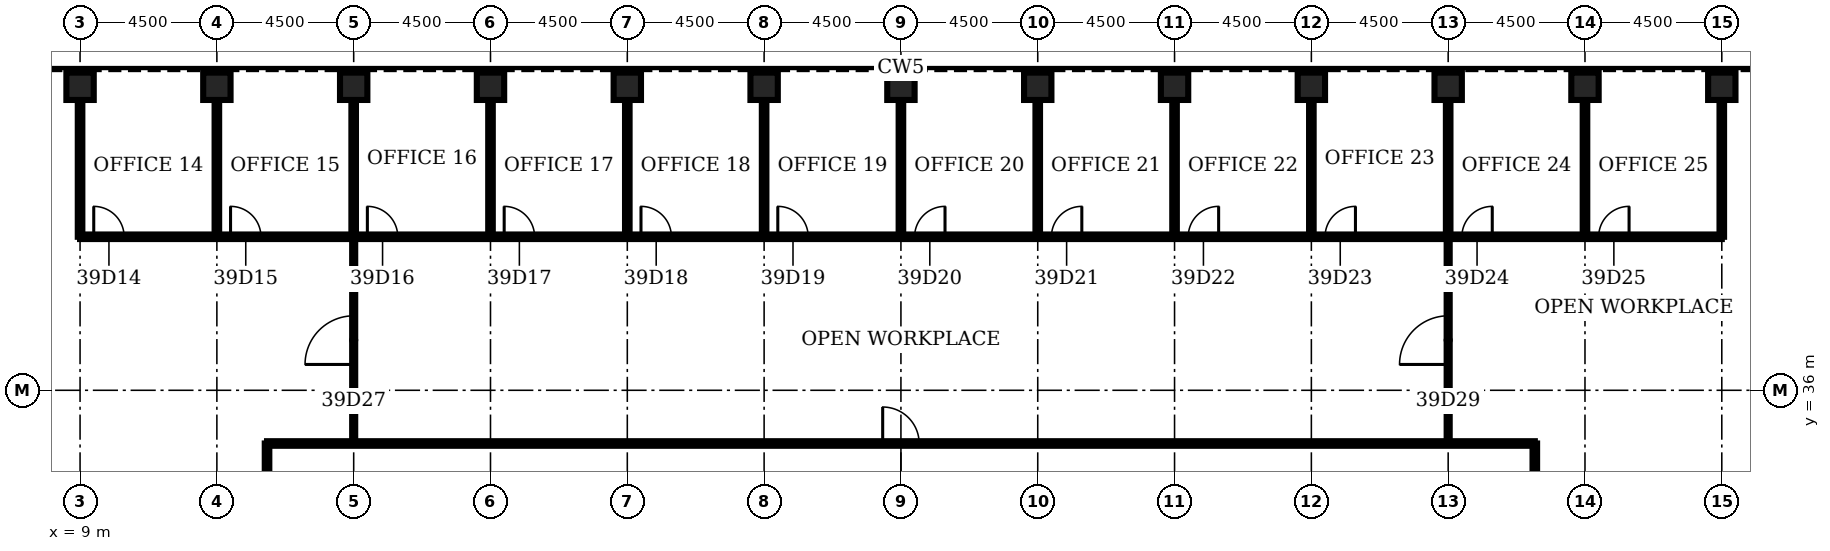
"""IFC4 building model, lengths in metres.
Left out: names, types, materials, properties, quantities, classifications, styles, units other than length and angle.
Written with IfcOpenShell. Run it as: python <this file> out.ifc"""

import sys

from ifc_helpers import new_model, si_unit, direction, frame, frame_2d, origin, origin_2d, place, context, subcontext, project, spatial, rectangle, hollow_rectangle, extrude, element, fill, save


model = new_model("IFC4")
c1 = context("Model", 3, precision=1e-05, world=origin(), true_north=direction((0.0, 1.0)))
c2 = subcontext(c1, "Body", "Model", "MODEL_VIEW")
j1 = project(units=[si_unit("LENGTHUNIT", "METRE"), si_unit("PLANEANGLEUNIT", "RADIAN")], contexts=[c1])
p1 = place(None, origin())
s1 = spatial("IfcSite", under=j1, at=p1, CompositionType="ELEMENT")
p2 = place(p1, origin())
s2 = spatial("IfcBuilding", under=s1, at=p2, CompositionType="ELEMENT")
p3 = place(p2, frame((0.0, 0.0, 176.1)))
s3 = spatial("IfcBuildingStorey", under=s2, at=p3, CompositionType="ELEMENT", Elevation=176.1)
for number, where, z_axis, x_axis in (
    (1, (63.0, 46.0, 0.0), (0.0, 0.0, 1.0), (0.0, 1.0, 0.0)),
    (2, (58.5, 46.0, 0.0), (0.0, 0.0, 1.0), (0.0, 1.0, 0.0)),
    (3, (54.0, 46.0, 0.0), (0.0, 0.0, 1.0), (0.0, 1.0, 0.0)),
    (4, (49.5, 46.0, 0.0), (0.0, 0.0, 1.0), (0.0, 1.0, 0.0)),
    (5, (45.0, 46.0, 0.0), (0.0, 0.0, 1.0), (0.0, 1.0, 0.0)),
    (6, (40.5, 46.0, 0.0), (0.0, 0.0, 1.0), (0.0, 1.0, 0.0)),
    (7, (36.0, 46.0, 0.0), (0.0, 0.0, 1.0), (0.0, 1.0, 0.0)),
    (8, (31.5, 46.0, 0.0), (0.0, 0.0, 1.0), (0.0, 1.0, 0.0)),
    (9, (27.0, 46.0, 0.0), (0.0, 0.0, 1.0), (0.0, 1.0, 0.0)),
    (10, (22.5, 46.0, 0.0), (0.0, 0.0, 1.0), (0.0, 1.0, 0.0)),
    (11, (18.0, 46.0, 0.0), (0.0, 0.0, 1.0), (0.0, 1.0, 0.0)),
    (12, (13.5, 46.0, 0.0), (0.0, 0.0, 1.0), (0.0, 1.0, 0.0)),
    (13, (9.0, 46.0, 0.0), (0.0, 0.0, 1.0), (0.0, 1.0, 0.0)),
):
    element("IfcColumn", number, at=place(p3, frame(where, z_axis=z_axis, x_axis=x_axis)), inside=s3, PredefinedType="COLUMN", context=c2, shape_type="SweptSolid", body=[
        extrude(hollow_rectangle(XDim=0.9, YDim=0.9, WallThickness=0.09, at=origin_2d()), origin(), (0.0, 0.0, 1.0), 4.2),
    ])
p4 = place(p3, frame((15.15, 34.25, 0.0), z_axis=(0.0, 0.0, 1.0), x_axis=(1.0, 0.0, 0.0)))
e14 = element("IfcWall", 14, at=p4, inside=s3, PredefinedType="PARTITIONING", context=c2, shape_type="SweptSolid", body=[
    extrude(rectangle(XDim=41.7, YDim=0.15, at=frame_2d((20.85, 0.0))), origin(), (0.0, 0.0, 1.0), 3.0),
])
p5 = place(p4, frame((20.25, 0.0, 0.0)))
e15 = element("IfcOpeningElement", 15, at=p5, cuts=e14, PredefinedType="OPENING", context=c2, shape_type="SweptSolid", body=[
    extrude(rectangle(XDim=1.2, YDim=2.1, at=frame_2d((0.6, 1.05))), frame((0.0, 0.085, 0.0), z_axis=(0.0, -1.0, 0.0), x_axis=(1.0, 0.0, 0.0)), (0.0, 0.0, 1.0), 0.17),
])
p6 = place(p3, frame((9.0, 41.05, 0.0), z_axis=(0.0, 0.0, 1.0), x_axis=(1.0, 0.0, 0.0)))
e16 = element("IfcWall", 16, at=p6, inside=s3, PredefinedType="PARTITIONING", context=c2, shape_type="SweptSolid", body=[
    extrude(rectangle(XDim=54.0, YDim=0.15, at=frame_2d((27.0, 0.0))), origin(), (0.0, 0.0, 1.0), 3.0),
])
p7 = place(p6, frame((0.45, 0.0, 0.0)))
e17 = element("IfcOpeningElement", 17, at=p7, cuts=e16, PredefinedType="OPENING", context=c2, shape_type="SweptSolid", body=[
    extrude(rectangle(XDim=1.0, YDim=2.1, at=frame_2d((0.5, 1.05))), frame((0.0, 0.085, 0.0), z_axis=(0.0, -1.0, 0.0), x_axis=(1.0, 0.0, 0.0)), (0.0, 0.0, 1.0), 0.17),
])
p8 = place(p6, frame((4.95, 0.0, 0.0)))
e18 = element("IfcOpeningElement", 18, at=p8, cuts=e16, PredefinedType="OPENING", context=c2, shape_type="SweptSolid", body=[
    extrude(rectangle(XDim=1.0, YDim=2.1, at=frame_2d((0.5, 1.05))), frame((0.0, 0.085, 0.0), z_axis=(0.0, -1.0, 0.0), x_axis=(1.0, 0.0, 0.0)), (0.0, 0.0, 1.0), 0.17),
])
p9 = place(p6, frame((9.45, 0.0, 0.0)))
e19 = element("IfcOpeningElement", 19, at=p9, cuts=e16, PredefinedType="OPENING", context=c2, shape_type="SweptSolid", body=[
    extrude(rectangle(XDim=1.0, YDim=2.1, at=frame_2d((0.5, 1.05))), frame((0.0, 0.085, 0.0), z_axis=(0.0, -1.0, 0.0), x_axis=(1.0, 0.0, 0.0)), (0.0, 0.0, 1.0), 0.17),
])
p10 = place(p6, frame((13.95, 0.0, 0.0)))
e20 = element("IfcOpeningElement", 20, at=p10, cuts=e16, PredefinedType="OPENING", context=c2, shape_type="SweptSolid", body=[
    extrude(rectangle(XDim=1.0, YDim=2.1, at=frame_2d((0.5, 1.05))), frame((0.0, 0.085, 0.0), z_axis=(0.0, -1.0, 0.0), x_axis=(1.0, 0.0, 0.0)), (0.0, 0.0, 1.0), 0.17),
])
p11 = place(p6, frame((18.45, 0.0, 0.0)))
e21 = element("IfcOpeningElement", 21, at=p11, cuts=e16, PredefinedType="OPENING", context=c2, shape_type="SweptSolid", body=[
    extrude(rectangle(XDim=1.0, YDim=2.1, at=frame_2d((0.5, 1.05))), frame((0.0, 0.085, 0.0), z_axis=(0.0, -1.0, 0.0), x_axis=(1.0, 0.0, 0.0)), (0.0, 0.0, 1.0), 0.17),
])
p12 = place(p6, frame((22.95, 0.0, 0.0)))
e22 = element("IfcOpeningElement", 22, at=p12, cuts=e16, PredefinedType="OPENING", context=c2, shape_type="SweptSolid", body=[
    extrude(rectangle(XDim=1.0, YDim=2.1, at=frame_2d((0.5, 1.05))), frame((0.0, 0.085, 0.0), z_axis=(0.0, -1.0, 0.0), x_axis=(1.0, 0.0, 0.0)), (0.0, 0.0, 1.0), 0.17),
])
p13 = place(p6, frame((27.45, 0.0, 0.0)))
e23 = element("IfcOpeningElement", 23, at=p13, cuts=e16, PredefinedType="OPENING", context=c2, shape_type="SweptSolid", body=[
    extrude(rectangle(XDim=1.0, YDim=2.1, at=frame_2d((0.5, 1.05))), frame((0.0, 0.085, 0.0), z_axis=(0.0, -1.0, 0.0), x_axis=(1.0, 0.0, 0.0)), (0.0, 0.0, 1.0), 0.17),
])
p14 = place(p6, frame((31.95, 0.0, 0.0)))
e24 = element("IfcOpeningElement", 24, at=p14, cuts=e16, PredefinedType="OPENING", context=c2, shape_type="SweptSolid", body=[
    extrude(rectangle(XDim=1.0, YDim=2.1, at=frame_2d((0.5, 1.05))), frame((0.0, 0.085, 0.0), z_axis=(0.0, -1.0, 0.0), x_axis=(1.0, 0.0, 0.0)), (0.0, 0.0, 1.0), 0.17),
])
p15 = place(p6, frame((36.45, 0.0, 0.0)))
e25 = element("IfcOpeningElement", 25, at=p15, cuts=e16, PredefinedType="OPENING", context=c2, shape_type="SweptSolid", body=[
    extrude(rectangle(XDim=1.0, YDim=2.1, at=frame_2d((0.5, 1.05))), frame((0.0, 0.085, 0.0), z_axis=(0.0, -1.0, 0.0), x_axis=(1.0, 0.0, 0.0)), (0.0, 0.0, 1.0), 0.17),
])
p16 = place(p6, frame((40.95, 0.0, 0.0)))
e26 = element("IfcOpeningElement", 26, at=p16, cuts=e16, PredefinedType="OPENING", context=c2, shape_type="SweptSolid", body=[
    extrude(rectangle(XDim=1.0, YDim=2.1, at=frame_2d((0.5, 1.05))), frame((0.0, 0.085, 0.0), z_axis=(0.0, -1.0, 0.0), x_axis=(1.0, 0.0, 0.0)), (0.0, 0.0, 1.0), 0.17),
])
p17 = place(p6, frame((45.45, 0.0, 0.0)))
e27 = element("IfcOpeningElement", 27, at=p17, cuts=e16, PredefinedType="OPENING", context=c2, shape_type="SweptSolid", body=[
    extrude(rectangle(XDim=1.0, YDim=2.1, at=frame_2d((0.5, 1.05))), frame((0.0, 0.085, 0.0), z_axis=(0.0, -1.0, 0.0), x_axis=(1.0, 0.0, 0.0)), (0.0, 0.0, 1.0), 0.17),
])
p18 = place(p6, frame((49.95, 0.0, 0.0)))
e28 = element("IfcOpeningElement", 28, at=p18, cuts=e16, PredefinedType="OPENING", context=c2, shape_type="SweptSolid", body=[
    extrude(rectangle(XDim=1.0, YDim=2.1, at=frame_2d((0.5, 1.05))), frame((0.0, 0.085, 0.0), z_axis=(0.0, -1.0, 0.0), x_axis=(1.0, 0.0, 0.0)), (0.0, 0.0, 1.0), 0.17),
])
for number, where, z_axis, x_axis in (
    (29, (9.0, 41.05, 0.0), (0.0, 0.0, 1.0), (0.0, 1.0, 0.0)),
    (30, (13.5, 41.05, 0.0), (0.0, 0.0, 1.0), (0.0, 1.0, 0.0)),
):
    element("IfcWall", number, at=place(p3, frame(where, z_axis=z_axis, x_axis=x_axis)), inside=s3, PredefinedType="PARTITIONING", context=c2, shape_type="SweptSolid", body=[
        extrude(rectangle(XDim=4.5, YDim=0.15, at=frame_2d((2.25, 0.0))), origin(), (0.0, 0.0, 1.0), 3.0),
    ])
p19 = place(p3, frame((15.15, 13.75, 0.0), z_axis=(0.0, 0.0, 1.0), x_axis=(0.0, 1.0, 0.0)))
e31 = element("IfcWall", 31, at=p19, inside=s3, PredefinedType="PARTITIONING", context=c2, shape_type="SweptSolid", body=[
    extrude(rectangle(XDim=20.5, YDim=0.15, at=frame_2d((10.25, 0.0))), origin(), (0.0, 0.0, 1.0), 3.0),
])
p20 = place(p19, frame((9.65, 0.0, 0.0)))
e32 = element("IfcOpeningElement", 32, at=p20, cuts=e31, PredefinedType="OPENING", context=c2, shape_type="SweptSolid", body=[
    extrude(rectangle(XDim=1.2, YDim=2.1, at=frame_2d((0.6, 1.05))), frame((0.0, 0.085, 0.0), z_axis=(0.0, -1.0, 0.0), x_axis=(1.0, 0.0, 0.0)), (0.0, 0.0, 1.0), 0.17),
])
p21 = place(p3, frame((18.0, 34.25, 0.0), z_axis=(0.0, 0.0, 1.0), x_axis=(0.0, 1.0, 0.0)))
e33 = element("IfcWall", 33, at=p21, inside=s3, PredefinedType="PARTITIONING", context=c2, shape_type="SweptSolid", body=[
    extrude(rectangle(XDim=6.8, YDim=0.1, at=frame_2d((3.4, 0.0))), origin(), (0.0, 0.0, 1.0), 3.0),
])
p22 = place(p21, frame((2.6, 0.0, 0.0)))
e34 = element("IfcOpeningElement", 34, at=p22, cuts=e33, PredefinedType="OPENING", context=c2, shape_type="SweptSolid", body=[
    extrude(rectangle(XDim=1.6, YDim=2.1, at=frame_2d((0.8, 1.05))), frame((0.0, 0.06, 0.0), z_axis=(0.0, -1.0, 0.0), x_axis=(1.0, 0.0, 0.0)), (0.0, 0.0, 1.0), 0.12),
])
for number, where, z_axis, x_axis in (
    (35, (18.0, 41.05, 0.0), (0.0, 0.0, 1.0), (0.0, 1.0, 0.0)),
    (36, (22.5, 41.05, 0.0), (0.0, 0.0, 1.0), (0.0, 1.0, 0.0)),
    (37, (27.0, 41.05, 0.0), (0.0, 0.0, 1.0), (0.0, 1.0, 0.0)),
    (38, (31.5, 41.05, 0.0), (0.0, 0.0, 1.0), (0.0, 1.0, 0.0)),
    (39, (36.0, 41.05, 0.0), (0.0, 0.0, 1.0), (0.0, 1.0, 0.0)),
    (40, (40.5, 41.05, 0.0), (0.0, 0.0, 1.0), (0.0, 1.0, 0.0)),
    (41, (45.0, 41.05, 0.0), (0.0, 0.0, 1.0), (0.0, 1.0, 0.0)),
    (42, (49.5, 41.05, 0.0), (0.0, 0.0, 1.0), (0.0, 1.0, 0.0)),
):
    element("IfcWall", number, at=place(p3, frame(where, z_axis=z_axis, x_axis=x_axis)), inside=s3, PredefinedType="PARTITIONING", context=c2, shape_type="SweptSolid", body=[
        extrude(rectangle(XDim=4.5, YDim=0.15, at=frame_2d((2.25, 0.0))), origin(), (0.0, 0.0, 1.0), 3.0),
    ])
p23 = place(p3, frame((54.0, 34.25, 0.0), z_axis=(0.0, 0.0, 1.0), x_axis=(0.0, 1.0, 0.0)))
e43 = element("IfcWall", 43, at=p23, inside=s3, PredefinedType="PARTITIONING", context=c2, shape_type="SweptSolid", body=[
    extrude(rectangle(XDim=6.8, YDim=0.1, at=frame_2d((3.4, 0.0))), origin(), (0.0, 0.0, 1.0), 3.0),
])
p24 = place(p23, frame((2.6, 0.0, 0.0)))
e44 = element("IfcOpeningElement", 44, at=p24, cuts=e43, PredefinedType="OPENING", context=c2, shape_type="SweptSolid", body=[
    extrude(rectangle(XDim=1.6, YDim=2.1, at=frame_2d((0.8, 1.05))), frame((0.0, 0.06, 0.0), z_axis=(0.0, -1.0, 0.0), x_axis=(1.0, 0.0, 0.0)), (0.0, 0.0, 1.0), 0.12),
])
p25 = place(p3, frame((54.0, 41.05, 0.0), z_axis=(0.0, 0.0, 1.0), x_axis=(0.0, 1.0, 0.0)))
e45 = element("IfcWall", 45, at=p25, inside=s3, PredefinedType="PARTITIONING", context=c2, shape_type="SweptSolid", body=[
    extrude(rectangle(XDim=4.5, YDim=0.15, at=frame_2d((2.25, 0.0))), origin(), (0.0, 0.0, 1.0), 3.0),
])
p26 = place(p3, frame((56.85, 13.75, 0.0), z_axis=(0.0, 0.0, 1.0), x_axis=(0.0, 1.0, 0.0)))
e46 = element("IfcWall", 46, at=p26, inside=s3, PredefinedType="PARTITIONING", context=c2, shape_type="SweptSolid", body=[
    extrude(rectangle(XDim=20.5, YDim=0.15, at=frame_2d((10.25, 0.0))), origin(), (0.0, 0.0, 1.0), 3.0),
])
p27 = place(p26, frame((9.65, 0.0, 0.0)))
e47 = element("IfcOpeningElement", 47, at=p27, cuts=e46, PredefinedType="OPENING", context=c2, shape_type="SweptSolid", body=[
    extrude(rectangle(XDim=1.2, YDim=2.1, at=frame_2d((0.6, 1.05))), frame((0.0, 0.085, 0.0), z_axis=(0.0, -1.0, 0.0), x_axis=(1.0, 0.0, 0.0)), (0.0, 0.0, 1.0), 0.17),
])
for number, where, z_axis, x_axis in (
    (48, (58.5, 41.05, 0.0), (0.0, 0.0, 1.0), (0.0, 1.0, 0.0)),
    (49, (63.0, 41.05, 0.0), (0.0, 0.0, 1.0), (0.0, 1.0, 0.0)),
):
    element("IfcWall", number, at=place(p3, frame(where, z_axis=z_axis, x_axis=x_axis)), inside=s3, PredefinedType="PARTITIONING", context=c2, shape_type="SweptSolid", body=[
        extrude(rectangle(XDim=4.5, YDim=0.15, at=frame_2d((2.25, 0.0))), origin(), (0.0, 0.0, 1.0), 3.0),
    ])
p28 = place(p7, origin())
e50 = element("IfcDoor", 50, at=p28, inside=s3, OperationType="SINGLE_SWING_LEFT", PredefinedType="DOOR", context=c2, shape_type="SweptSolid", body=[
    extrude(rectangle(XDim=1.0, YDim=2.1, at=frame_2d((0.5, 1.05))), frame((0.0, 0.025, 0.0), z_axis=(0.0, -1.0, 0.0), x_axis=(1.0, 0.0, 0.0)), (0.0, 0.0, 1.0), 0.05),
])
fill(e17, e50)
p29 = place(p8, origin())
e51 = element("IfcDoor", 51, at=p29, inside=s3, OperationType="SINGLE_SWING_LEFT", PredefinedType="DOOR", context=c2, shape_type="SweptSolid", body=[
    extrude(rectangle(XDim=1.0, YDim=2.1, at=frame_2d((0.5, 1.05))), frame((0.0, 0.025, 0.0), z_axis=(0.0, -1.0, 0.0), x_axis=(1.0, 0.0, 0.0)), (0.0, 0.0, 1.0), 0.05),
])
fill(e18, e51)
p30 = place(p9, origin())
e52 = element("IfcDoor", 52, at=p30, inside=s3, OperationType="SINGLE_SWING_LEFT", PredefinedType="DOOR", context=c2, shape_type="SweptSolid", body=[
    extrude(rectangle(XDim=1.0, YDim=2.1, at=frame_2d((0.5, 1.05))), frame((0.0, 0.025, 0.0), z_axis=(0.0, -1.0, 0.0), x_axis=(1.0, 0.0, 0.0)), (0.0, 0.0, 1.0), 0.05),
])
fill(e19, e52)
p31 = place(p10, origin())
e53 = element("IfcDoor", 53, at=p31, inside=s3, OperationType="SINGLE_SWING_LEFT", PredefinedType="DOOR", context=c2, shape_type="SweptSolid", body=[
    extrude(rectangle(XDim=1.0, YDim=2.1, at=frame_2d((0.5, 1.05))), frame((0.0, 0.025, 0.0), z_axis=(0.0, -1.0, 0.0), x_axis=(1.0, 0.0, 0.0)), (0.0, 0.0, 1.0), 0.05),
])
fill(e20, e53)
p32 = place(p11, origin())
e54 = element("IfcDoor", 54, at=p32, inside=s3, OperationType="SINGLE_SWING_LEFT", PredefinedType="DOOR", context=c2, shape_type="SweptSolid", body=[
    extrude(rectangle(XDim=1.0, YDim=2.1, at=frame_2d((0.5, 1.05))), frame((0.0, 0.025, 0.0), z_axis=(0.0, -1.0, 0.0), x_axis=(1.0, 0.0, 0.0)), (0.0, 0.0, 1.0), 0.05),
])
fill(e21, e54)
p33 = place(p12, origin())
e55 = element("IfcDoor", 55, at=p33, inside=s3, OperationType="SINGLE_SWING_LEFT", PredefinedType="DOOR", context=c2, shape_type="SweptSolid", body=[
    extrude(rectangle(XDim=1.0, YDim=2.1, at=frame_2d((0.5, 1.05))), frame((0.0, 0.025, 0.0), z_axis=(0.0, -1.0, 0.0), x_axis=(1.0, 0.0, 0.0)), (0.0, 0.0, 1.0), 0.05),
])
fill(e22, e55)
p34 = place(p13, origin())
e56 = element("IfcDoor", 56, at=p34, inside=s3, OperationType="SINGLE_SWING_RIGHT", PredefinedType="DOOR", context=c2, shape_type="SweptSolid", body=[
    extrude(rectangle(XDim=1.0, YDim=2.1, at=frame_2d((0.5, 1.05))), frame((0.0, 0.025, 0.0), z_axis=(0.0, -1.0, 0.0), x_axis=(1.0, 0.0, 0.0)), (0.0, 0.0, 1.0), 0.05),
])
fill(e23, e56)
p35 = place(p14, origin())
e57 = element("IfcDoor", 57, at=p35, inside=s3, OperationType="SINGLE_SWING_RIGHT", PredefinedType="DOOR", context=c2, shape_type="SweptSolid", body=[
    extrude(rectangle(XDim=1.0, YDim=2.1, at=frame_2d((0.5, 1.05))), frame((0.0, 0.025, 0.0), z_axis=(0.0, -1.0, 0.0), x_axis=(1.0, 0.0, 0.0)), (0.0, 0.0, 1.0), 0.05),
])
fill(e24, e57)
p36 = place(p15, origin())
e58 = element("IfcDoor", 58, at=p36, inside=s3, OperationType="SINGLE_SWING_RIGHT", PredefinedType="DOOR", context=c2, shape_type="SweptSolid", body=[
    extrude(rectangle(XDim=1.0, YDim=2.1, at=frame_2d((0.5, 1.05))), frame((0.0, 0.025, 0.0), z_axis=(0.0, -1.0, 0.0), x_axis=(1.0, 0.0, 0.0)), (0.0, 0.0, 1.0), 0.05),
])
fill(e25, e58)
p37 = place(p16, origin())
e59 = element("IfcDoor", 59, at=p37, inside=s3, OperationType="SINGLE_SWING_RIGHT", PredefinedType="DOOR", context=c2, shape_type="SweptSolid", body=[
    extrude(rectangle(XDim=1.0, YDim=2.1, at=frame_2d((0.5, 1.05))), frame((0.0, 0.025, 0.0), z_axis=(0.0, -1.0, 0.0), x_axis=(1.0, 0.0, 0.0)), (0.0, 0.0, 1.0), 0.05),
])
fill(e26, e59)
p38 = place(p17, origin())
e60 = element("IfcDoor", 60, at=p38, inside=s3, OperationType="SINGLE_SWING_RIGHT", PredefinedType="DOOR", context=c2, shape_type="SweptSolid", body=[
    extrude(rectangle(XDim=1.0, YDim=2.1, at=frame_2d((0.5, 1.05))), frame((0.0, 0.025, 0.0), z_axis=(0.0, -1.0, 0.0), x_axis=(1.0, 0.0, 0.0)), (0.0, 0.0, 1.0), 0.05),
])
fill(e27, e60)
p39 = place(p18, origin())
e61 = element("IfcDoor", 61, at=p39, inside=s3, OperationType="SINGLE_SWING_RIGHT", PredefinedType="DOOR", context=c2, shape_type="SweptSolid", body=[
    extrude(rectangle(XDim=1.0, YDim=2.1, at=frame_2d((0.5, 1.05))), frame((0.0, 0.025, 0.0), z_axis=(0.0, -1.0, 0.0), x_axis=(1.0, 0.0, 0.0)), (0.0, 0.0, 1.0), 0.05),
])
fill(e28, e61)
p40 = place(p22, origin())
e62 = element("IfcDoor", 62, at=p40, inside=s3, OperationType="SINGLE_SWING_LEFT", PredefinedType="DOOR", context=c2, shape_type="SweptSolid", body=[
    extrude(rectangle(XDim=1.6, YDim=2.1, at=frame_2d((0.8, 1.05))), frame((0.0, 0.025, 0.0), z_axis=(0.0, -1.0, 0.0), x_axis=(1.0, 0.0, 0.0)), (0.0, 0.0, 1.0), 0.05),
])
fill(e34, e62)
p41 = place(p24, origin())
e63 = element("IfcDoor", 63, at=p41, inside=s3, OperationType="SINGLE_SWING_LEFT", PredefinedType="DOOR", context=c2, shape_type="SweptSolid", body=[
    extrude(rectangle(XDim=1.6, YDim=2.1, at=frame_2d((0.8, 1.05))), frame((0.0, 0.025, 0.0), z_axis=(0.0, -1.0, 0.0), x_axis=(1.0, 0.0, 0.0)), (0.0, 0.0, 1.0), 0.05),
])
fill(e44, e63)
p42 = place(p5, origin())
e64 = element("IfcDoor", 64, at=p42, inside=s3, OperationType="SINGLE_SWING_LEFT", PredefinedType="DOOR", context=c2, shape_type="SweptSolid", body=[
    extrude(rectangle(XDim=1.2, YDim=2.1, at=frame_2d((0.6, 1.05))), frame((0.0, 0.025, 0.0), z_axis=(0.0, -1.0, 0.0), x_axis=(1.0, 0.0, 0.0)), (0.0, 0.0, 1.0), 0.05),
])
fill(e15, e64)
save(model, sys.argv[1])
